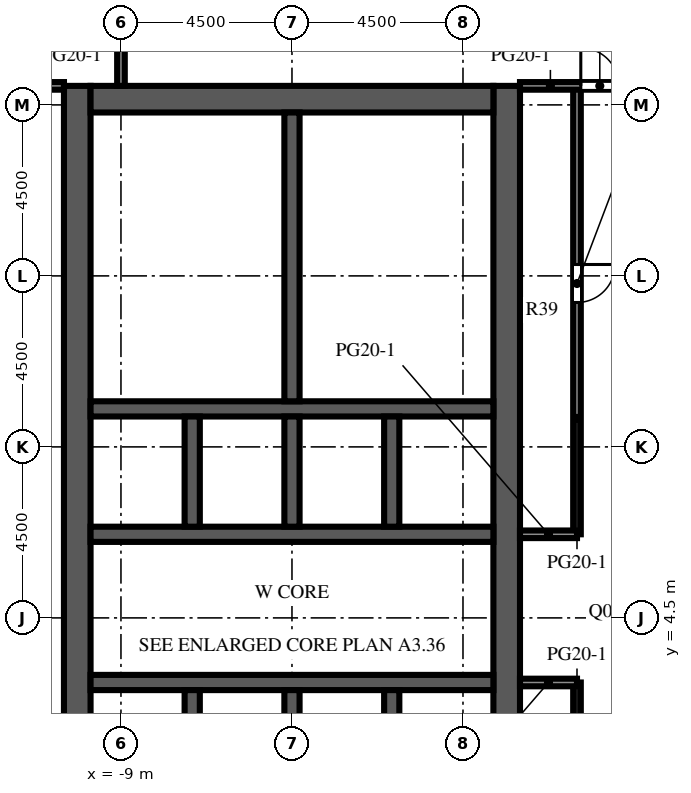
"""IFC4 building model, lengths in metres.
Left out: names, types, materials, properties, quantities, classifications, styles, units other than length and angle.
Written with IfcOpenShell. Run it as: python <this file> out.ifc"""

import sys

from ifc_helpers import new_model, si_unit, direction, frame, frame_2d, origin, place, context, subcontext, project, spatial, rectangle, extrude, element, fill, save


model = new_model("IFC4")
c1 = context("Model", 3, precision=1e-05, world=origin(), true_north=direction((0.0, 1.0)))
c2 = subcontext(c1, "Body", "Model", "MODEL_VIEW")
j1 = project(units=[si_unit("LENGTHUNIT", "METRE"), si_unit("PLANEANGLEUNIT", "RADIAN")], contexts=[c1])
p1 = place(None, origin())
s1 = spatial("IfcSite", under=j1, at=p1, CompositionType="ELEMENT")
p2 = place(p1, origin())
s2 = spatial("IfcBuilding", under=s1, at=p2, CompositionType="ELEMENT")
p3 = place(p2, frame((0.0, 0.0, 252.1)))
s3 = spatial("IfcBuildingStorey", under=s2, at=p3, CompositionType="ELEMENT", Elevation=252.1)
p4 = place(p3, frame((-10.15, -9.0, 0.0), z_axis=(0.0, 0.0, 1.0), x_axis=(0.0, 1.0, 0.0)))
e1 = element("IfcWall", 1, at=p4, inside=s3, PredefinedType="SHEAR", context=c2, shape_type="SweptSolid", body=[
    extrude(rectangle(XDim=27.5, YDim=0.7, at=frame_2d((13.75, 0.0))), origin(), (0.0, 0.0, 1.0), 4.1),
])
p5 = place(p4, frame((12.55, 0.0, 0.0)))
e2 = element("IfcOpeningElement", 2, at=p5, cuts=e1, PredefinedType="OPENING", context=c2, shape_type="SweptSolid", body=[
    extrude(rectangle(XDim=2.4, YDim=2.4, at=frame_2d((1.2, 1.2))), frame((0.0, 0.36, 0.0), z_axis=(0.0, -1.0, 0.0), x_axis=(1.0, 0.0, 0.0)), (0.0, 0.0, 1.0), 0.72),
])
p6 = place(p4, frame((6.825, 0.0, 0.0)))
e3 = element("IfcOpeningElement", 3, at=p6, cuts=e1, PredefinedType="OPENING", context=c2, shape_type="SweptSolid", body=[
    extrude(rectangle(XDim=1.2, YDim=2.1, at=frame_2d((0.6, 1.05))), frame((0.0, 0.36, 0.0), z_axis=(0.0, -1.0, 0.0), x_axis=(1.0, 0.0, 0.0)), (0.0, 0.0, 1.0), 0.72),
])
p7 = place(p4, frame((19.475, 0.0, 0.0)))
e4 = element("IfcOpeningElement", 4, at=p7, cuts=e1, PredefinedType="OPENING", context=c2, shape_type="SweptSolid", body=[
    extrude(rectangle(XDim=1.2, YDim=2.1, at=frame_2d((0.6, 1.05))), frame((0.0, 0.36, 0.0), z_axis=(0.0, -1.0, 0.0), x_axis=(1.0, 0.0, 0.0)), (0.0, 0.0, 1.0), 0.72),
])
p8 = place(p3, frame((1.15, -9.0, 0.0), z_axis=(0.0, 0.0, 1.0), x_axis=(0.0, 1.0, 0.0)))
e5 = element("IfcWall", 5, at=p8, inside=s3, PredefinedType="SHEAR", context=c2, shape_type="SweptSolid", body=[
    extrude(rectangle(XDim=27.5, YDim=0.7, at=frame_2d((13.75, 0.0))), origin(), (0.0, 0.0, 1.0), 4.1),
])
p9 = place(p8, frame((12.55, 0.0, 0.0)))
e6 = element("IfcOpeningElement", 6, at=p9, cuts=e5, PredefinedType="OPENING", context=c2, shape_type="SweptSolid", body=[
    extrude(rectangle(XDim=2.4, YDim=2.4, at=frame_2d((1.2, 1.2))), frame((0.0, 0.36, 0.0), z_axis=(0.0, -1.0, 0.0), x_axis=(1.0, 0.0, 0.0)), (0.0, 0.0, 1.0), 0.72),
])
p10 = place(p8, frame((3.9, 0.0, 0.0)))
e7 = element("IfcOpeningElement", 7, at=p10, cuts=e5, PredefinedType="OPENING", context=c2, shape_type="SweptSolid", body=[
    extrude(rectangle(XDim=1.2, YDim=2.1, at=frame_2d((0.6, 1.05))), frame((0.0, 0.36, 0.0), z_axis=(0.0, -1.0, 0.0), x_axis=(1.0, 0.0, 0.0)), (0.0, 0.0, 1.0), 0.72),
])
p11 = place(p8, frame((22.4, 0.0, 0.0)))
e8 = element("IfcOpeningElement", 8, at=p11, cuts=e5, PredefinedType="OPENING", context=c2, shape_type="SweptSolid", body=[
    extrude(rectangle(XDim=1.2, YDim=2.1, at=frame_2d((0.6, 1.05))), frame((0.0, 0.36, 0.0), z_axis=(0.0, -1.0, 0.0), x_axis=(1.0, 0.0, 0.0)), (0.0, 0.0, 1.0), 0.72),
])
p12 = place(p3, frame((-9.8, 18.15, 0.0), z_axis=(0.0, 0.0, 1.0), x_axis=(1.0, 0.0, 0.0)))
e9 = element("IfcWall", 9, at=p12, inside=s3, PredefinedType="SHEAR", context=c2, shape_type="SweptSolid", body=[
    extrude(rectangle(XDim=10.6, YDim=0.7, at=frame_2d((5.3, 0.0))), origin(), (0.0, 0.0, 1.0), 4.1),
])
p13 = place(p3, frame((-9.8, 2.8, 0.0), z_axis=(0.0, 0.0, 1.0), x_axis=(1.0, 0.0, 0.0)))
e10 = element("IfcWall", 10, at=p13, inside=s3, PredefinedType="SHEAR", context=c2, shape_type="SweptSolid", body=[
    extrude(rectangle(XDim=10.6, YDim=0.4, at=frame_2d((5.3, 0.0))), origin(), (0.0, 0.0, 1.0), 4.1),
])
p14 = place(p13, frame((0.688, 0.0, 0.0)))
e11 = element("IfcOpeningElement", 11, at=p14, cuts=e10, PredefinedType="OPENING", context=c2, shape_type="SweptSolid", body=[
    extrude(rectangle(XDim=1.1, YDim=2.1, at=frame_2d((0.55, 1.05))), frame((0.0, 0.21, 0.0), z_axis=(0.0, -1.0, 0.0), x_axis=(1.0, 0.0, 0.0)), (0.0, 0.0, 1.0), 0.42),
])
p15 = place(p13, frame((3.438, 0.0, 0.0)))
e12 = element("IfcOpeningElement", 12, at=p15, cuts=e10, PredefinedType="OPENING", context=c2, shape_type="SweptSolid", body=[
    extrude(rectangle(XDim=1.1, YDim=2.1, at=frame_2d((0.55, 1.05))), frame((0.0, 0.21, 0.0), z_axis=(0.0, -1.0, 0.0), x_axis=(1.0, 0.0, 0.0)), (0.0, 0.0, 1.0), 0.42),
])
p16 = place(p13, frame((6.113, 0.0, 0.0)))
e13 = element("IfcOpeningElement", 13, at=p16, cuts=e10, PredefinedType="OPENING", context=c2, shape_type="SweptSolid", body=[
    extrude(rectangle(XDim=1.0, YDim=2.1, at=frame_2d((0.5, 1.05))), frame((0.0, 0.21, 0.0), z_axis=(0.0, -1.0, 0.0), x_axis=(1.0, 0.0, 0.0)), (0.0, 0.0, 1.0), 0.42),
])
p17 = place(p13, frame((8.863, 0.0, 0.0)))
e14 = element("IfcOpeningElement", 14, at=p17, cuts=e10, PredefinedType="OPENING", context=c2, shape_type="SweptSolid", body=[
    extrude(rectangle(XDim=1.0, YDim=2.1, at=frame_2d((0.5, 1.05))), frame((0.0, 0.21, 0.0), z_axis=(0.0, -1.0, 0.0), x_axis=(1.0, 0.0, 0.0)), (0.0, 0.0, 1.0), 0.42),
])
p18 = place(p3, frame((-9.8, 6.7, 0.0), z_axis=(0.0, 0.0, 1.0), x_axis=(1.0, 0.0, 0.0)))
e15 = element("IfcWall", 15, at=p18, inside=s3, PredefinedType="SHEAR", context=c2, shape_type="SweptSolid", body=[
    extrude(rectangle(XDim=10.6, YDim=0.4, at=frame_2d((5.3, 0.0))), origin(), (0.0, 0.0, 1.0), 4.1),
])
p19 = place(p18, frame((3.438, 0.0, 0.0)))
e16 = element("IfcOpeningElement", 16, at=p19, cuts=e15, PredefinedType="OPENING", context=c2, shape_type="SweptSolid", body=[
    extrude(rectangle(XDim=1.1, YDim=2.1, at=frame_2d((0.55, 1.05))), frame((0.0, 0.21, 0.0), z_axis=(0.0, -1.0, 0.0), x_axis=(1.0, 0.0, 0.0)), (0.0, 0.0, 1.0), 0.42),
])
p20 = place(p18, frame((6.062, 0.0, 0.0)))
e17 = element("IfcOpeningElement", 17, at=p20, cuts=e15, PredefinedType="OPENING", context=c2, shape_type="SweptSolid", body=[
    extrude(rectangle(XDim=1.1, YDim=2.1, at=frame_2d((0.55, 1.05))), frame((0.0, 0.21, 0.0), z_axis=(0.0, -1.0, 0.0), x_axis=(1.0, 0.0, 0.0)), (0.0, 0.0, 1.0), 0.42),
])
p21 = place(p18, frame((8.812, 0.0, 0.0)))
e18 = element("IfcOpeningElement", 18, at=p21, cuts=e15, PredefinedType="OPENING", context=c2, shape_type="SweptSolid", body=[
    extrude(rectangle(XDim=1.1, YDim=2.1, at=frame_2d((0.55, 1.05))), frame((0.0, 0.21, 0.0), z_axis=(0.0, -1.0, 0.0), x_axis=(1.0, 0.0, 0.0)), (0.0, 0.0, 1.0), 0.42),
])
p22 = place(p18, frame((0.738, 0.0, 0.0)))
e19 = element("IfcOpeningElement", 19, at=p22, cuts=e15, PredefinedType="OPENING", context=c2, shape_type="SweptSolid", body=[
    extrude(rectangle(XDim=1.0, YDim=2.1, at=frame_2d((0.5, 1.05))), frame((0.0, 0.21, 0.0), z_axis=(0.0, -1.0, 0.0), x_axis=(1.0, 0.0, 0.0)), (0.0, 0.0, 1.0), 0.42),
])
p23 = place(p3, frame((-9.8, 10.0, 0.0), z_axis=(0.0, 0.0, 1.0), x_axis=(1.0, 0.0, 0.0)))
e20 = element("IfcWall", 20, at=p23, inside=s3, PredefinedType="SHEAR", context=c2, shape_type="SweptSolid", body=[
    extrude(rectangle(XDim=10.6, YDim=0.4, at=frame_2d((5.3, 0.0))), origin(), (0.0, 0.0, 1.0), 4.1),
])
for number, where, z_axis, x_axis in (
    (21, (-7.125, -0.3, 0.0), (0.0, 0.0, 1.0), (0.0, 1.0, 0.0)),
    (22, (-7.125, 6.9, 0.0), (0.0, 0.0, 1.0), (0.0, 1.0, 0.0)),
    (23, (-4.5, -0.3, 0.0), (0.0, 0.0, 1.0), (0.0, 1.0, 0.0)),
    (24, (-4.5, 6.9, 0.0), (0.0, 0.0, 1.0), (0.0, 1.0, 0.0)),
    (25, (-1.875, -0.3, 0.0), (0.0, 0.0, 1.0), (0.0, 1.0, 0.0)),
    (26, (-1.875, 6.9, 0.0), (0.0, 0.0, 1.0), (0.0, 1.0, 0.0)),
):
    element("IfcWall", number, at=place(p3, frame(where, z_axis=z_axis, x_axis=x_axis)), inside=s3, PredefinedType="SHEAR", context=c2, shape_type="SweptSolid", body=[
        extrude(rectangle(XDim=2.9, YDim=0.4, at=frame_2d((1.45, 0.0))), origin(), (0.0, 0.0, 1.0), 4.1),
    ])
p24 = place(p3, frame((-4.5, 10.2, 0.0), z_axis=(0.0, 0.0, 1.0), x_axis=(0.0, 1.0, 0.0)))
e27 = element("IfcWall", 27, at=p24, inside=s3, PredefinedType="SHEAR", context=c2, shape_type="SweptSolid", body=[
    extrude(rectangle(XDim=7.6, YDim=0.4, at=frame_2d((3.8, 0.0))), origin(), (0.0, 0.0, 1.0), 4.1),
])
p25 = place(p3, frame((-0.6, 10.2, 0.0), z_axis=(0.0, 0.0, 1.0), x_axis=(0.0, 1.0, 0.0)))
e28 = element("IfcWall", 28, at=p25, inside=s3, PredefinedType="PARTITIONING", context=c2, shape_type="SweptSolid", body=[
    extrude(rectangle(XDim=2.28, YDim=0.1, at=frame_2d((1.14, 0.0))), origin(), (0.0, 0.0, 1.0), 3.65),
])
p26 = place(p25, frame((0.64, 0.0, 0.0)))
e29 = element("IfcOpeningElement", 29, at=p26, cuts=e28, PredefinedType="OPENING", context=c2, shape_type="SweptSolid", body=[
    extrude(rectangle(XDim=1.0, YDim=2.1, at=frame_2d((0.5, 1.05))), frame((0.0, 0.06, 0.0), z_axis=(0.0, -1.0, 0.0), x_axis=(1.0, 0.0, 0.0)), (0.0, 0.0, 1.0), 0.12),
])
p27 = place(p3, frame((-0.6, 12.48, 0.0), z_axis=(0.0, 0.0, 1.0), x_axis=(0.0, 1.0, 0.0)))
e30 = element("IfcWall", 30, at=p27, inside=s3, PredefinedType="PARTITIONING", context=c2, shape_type="SweptSolid", body=[
    extrude(rectangle(XDim=2.432, YDim=0.1, at=frame_2d((1.216, 0.0))), origin(), (0.0, 0.0, 1.0), 3.65),
])
p28 = place(p27, frame((0.716, 0.0, 0.0)))
e31 = element("IfcOpeningElement", 31, at=p28, cuts=e30, PredefinedType="OPENING", context=c2, shape_type="SweptSolid", body=[
    extrude(rectangle(XDim=1.0, YDim=2.1, at=frame_2d((0.5, 1.05))), frame((0.0, 0.06, 0.0), z_axis=(0.0, -1.0, 0.0), x_axis=(1.0, 0.0, 0.0)), (0.0, 0.0, 1.0), 0.12),
])
p29 = place(p3, frame((-0.6, 14.912, 0.0), z_axis=(0.0, 0.0, 1.0), x_axis=(0.0, 1.0, 0.0)))
e32 = element("IfcWall", 32, at=p29, inside=s3, PredefinedType="PARTITIONING", context=c2, shape_type="SweptSolid", body=[
    extrude(rectangle(XDim=2.888, YDim=0.1, at=frame_2d((1.444, 0.0))), origin(), (0.0, 0.0, 1.0), 3.65),
])
p30 = place(p29, frame((0.944, 0.0, 0.0)))
e33 = element("IfcOpeningElement", 33, at=p30, cuts=e32, PredefinedType="OPENING", context=c2, shape_type="SweptSolid", body=[
    extrude(rectangle(XDim=1.0, YDim=2.1, at=frame_2d((0.5, 1.05))), frame((0.0, 0.06, 0.0), z_axis=(0.0, -1.0, 0.0), x_axis=(1.0, 0.0, 0.0)), (0.0, 0.0, 1.0), 0.12),
])
for number, where, z_axis, x_axis in (
    (34, (-4.3, 12.48, 0.0), (0.0, 0.0, 1.0), (1.0, 0.0, 0.0)),
    (35, (-4.3, 14.912, 0.0), (0.0, 0.0, 1.0), (1.0, 0.0, 0.0)),
):
    element("IfcWall", number, at=place(p3, frame(where, z_axis=z_axis, x_axis=x_axis)), inside=s3, PredefinedType="PARTITIONING", context=c2, shape_type="SweptSolid", body=[
        extrude(rectangle(XDim=3.7, YDim=0.1, at=frame_2d((1.85, 0.0))), origin(), (0.0, 0.0, 1.0), 3.65),
    ])
p31 = place(p3, frame((-9.0, 18.5, 0.0), z_axis=(0.0, 0.0, 1.0), x_axis=(0.0, 1.0, 0.0)))
e36 = element("IfcWall", 36, at=p31, inside=s3, PredefinedType="PARTITIONING", context=c2, shape_type="SweptSolid", body=[
    extrude(rectangle(XDim=3.5, YDim=0.2, at=frame_2d((1.75, 0.0))), origin(), (0.0, 0.0, 1.0), 3.65),
])
p32 = place(p3, frame((3.0, -3.5, 0.0), z_axis=(0.0, 0.0, 1.0), x_axis=(0.0, 1.0, 0.0)))
e37 = element("IfcWall", 37, at=p32, inside=s3, PredefinedType="PARTITIONING", context=c2, shape_type="SweptSolid", body=[
    extrude(rectangle(XDim=6.3, YDim=0.2, at=frame_2d((3.15, 0.0))), origin(), (0.0, 0.0, 1.0), 3.65),
])
p33 = place(p32, frame((2.35, 0.0, 0.0)))
e38 = element("IfcOpeningElement", 38, at=p33, cuts=e37, PredefinedType="OPENING", context=c2, shape_type="SweptSolid", body=[
    extrude(rectangle(XDim=1.0, YDim=2.1, at=frame_2d((0.5, 1.05))), frame((0.0, 0.11, 0.0), z_axis=(0.0, -1.0, 0.0), x_axis=(1.0, 0.0, 0.0)), (0.0, 0.0, 1.0), 0.22),
])
p34 = place(p3, frame((3.0, 6.7, 0.0), z_axis=(0.0, 0.0, 1.0), x_axis=(0.0, 1.0, 0.0)))
e39 = element("IfcWall", 39, at=p34, inside=s3, PredefinedType="PARTITIONING", context=c2, shape_type="SweptSolid", body=[
    extrude(rectangle(XDim=11.8, YDim=0.2, at=frame_2d((5.9, 0.0))), origin(), (0.0, 0.0, 1.0), 3.65),
])
p35 = place(p34, frame((6.1, 0.0, 0.0)))
e40 = element("IfcOpeningElement", 40, at=p35, cuts=e39, PredefinedType="OPENING", context=c2, shape_type="SweptSolid", body=[
    extrude(rectangle(XDim=1.0, YDim=2.1, at=frame_2d((0.5, 1.05))), frame((0.0, 0.11, 0.0), z_axis=(0.0, -1.0, 0.0), x_axis=(1.0, 0.0, 0.0)), (0.0, 0.0, 1.0), 0.22),
])
for number, where, z_axis, x_axis in (
    (41, (1.5, 2.8, 0.0), (0.0, 0.0, 1.0), (1.0, 0.0, 0.0)),
    (42, (1.5, 6.7, 0.0), (0.0, 0.0, 1.0), (1.0, 0.0, 0.0)),
):
    element("IfcWall", number, at=place(p3, frame(where, z_axis=z_axis, x_axis=x_axis)), inside=s3, PredefinedType="PARTITIONING", context=c2, shape_type="SweptSolid", body=[
        extrude(rectangle(XDim=1.5, YDim=0.2, at=frame_2d((0.75, 0.0))), origin(), (0.0, 0.0, 1.0), 3.65),
    ])
p36 = place(p3, frame((-13.5, 18.5, 0.0), z_axis=(0.0, 0.0, 1.0), x_axis=(1.0, 0.0, 0.0)))
e43 = element("IfcWall", 43, at=p36, inside=s3, PredefinedType="PARTITIONING", context=c2, shape_type="SweptSolid", body=[
    extrude(rectangle(XDim=3.0, YDim=0.2, at=frame_2d((1.5, 0.0))), origin(), (0.0, 0.0, 1.0), 3.65),
])
p37 = place(p36, frame((0.85, 0.0, 0.0)))
e44 = element("IfcOpeningElement", 44, at=p37, cuts=e43, PredefinedType="OPENING", context=c2, shape_type="SweptSolid", body=[
    extrude(rectangle(XDim=1.0, YDim=2.1, at=frame_2d((0.5, 1.05))), frame((0.0, 0.11, 0.0), z_axis=(0.0, -1.0, 0.0), x_axis=(1.0, 0.0, 0.0)), (0.0, 0.0, 1.0), 0.22),
])
p38 = place(p3, frame((1.5, 18.5, 0.0), z_axis=(0.0, 0.0, 1.0), x_axis=(1.0, 0.0, 0.0)))
e45 = element("IfcWall", 45, at=p38, inside=s3, PredefinedType="PARTITIONING", context=c2, shape_type="SweptSolid", body=[
    extrude(rectangle(XDim=4.5, YDim=0.2, at=frame_2d((2.25, 0.0))), origin(), (0.0, 0.0, 1.0), 3.65),
])
p39 = place(p38, frame((1.6, 0.0, 0.0)))
e46 = element("IfcOpeningElement", 46, at=p39, cuts=e45, PredefinedType="OPENING", context=c2, shape_type="SweptSolid", body=[
    extrude(rectangle(XDim=1.0, YDim=2.1, at=frame_2d((0.5, 1.05))), frame((0.0, 0.11, 0.0), z_axis=(0.0, -1.0, 0.0), x_axis=(1.0, 0.0, 0.0)), (0.0, 0.0, 1.0), 0.22),
])
p40 = place(p38, frame((3.35, 0.0, 0.0)))
e47 = element("IfcOpeningElement", 47, at=p40, cuts=e45, PredefinedType="OPENING", context=c2, shape_type="SweptSolid", body=[
    extrude(rectangle(XDim=1.0, YDim=2.1, at=frame_2d((0.5, 1.05))), frame((0.0, 0.11, 0.0), z_axis=(0.0, -1.0, 0.0), x_axis=(1.0, 0.0, 0.0)), (0.0, 0.0, 1.0), 0.22),
])
p41 = place(p14, origin())
e48 = element("IfcDoor", 48, at=p41, inside=s3, OperationType="DOUBLE_DOOR_SLIDING", PredefinedType="DOOR", context=c2, shape_type="SweptSolid", body=[
    extrude(rectangle(XDim=1.1, YDim=2.1, at=frame_2d((0.55, 1.05))), frame((0.0, 0.025, 0.0), z_axis=(0.0, -1.0, 0.0), x_axis=(1.0, 0.0, 0.0)), (0.0, 0.0, 1.0), 0.05),
])
fill(e11, e48)
p42 = place(p15, origin())
e49 = element("IfcDoor", 49, at=p42, inside=s3, OperationType="DOUBLE_DOOR_SLIDING", PredefinedType="DOOR", context=c2, shape_type="SweptSolid", body=[
    extrude(rectangle(XDim=1.1, YDim=2.1, at=frame_2d((0.55, 1.05))), frame((0.0, 0.025, 0.0), z_axis=(0.0, -1.0, 0.0), x_axis=(1.0, 0.0, 0.0)), (0.0, 0.0, 1.0), 0.05),
])
fill(e12, e49)
p43 = place(p19, origin())
e50 = element("IfcDoor", 50, at=p43, inside=s3, OperationType="DOUBLE_DOOR_SLIDING", PredefinedType="DOOR", context=c2, shape_type="SweptSolid", body=[
    extrude(rectangle(XDim=1.1, YDim=2.1, at=frame_2d((0.55, 1.05))), frame((0.0, 0.025, 0.0), z_axis=(0.0, -1.0, 0.0), x_axis=(1.0, 0.0, 0.0)), (0.0, 0.0, 1.0), 0.05),
])
fill(e16, e50)
p44 = place(p20, origin())
e51 = element("IfcDoor", 51, at=p44, inside=s3, OperationType="DOUBLE_DOOR_SLIDING", PredefinedType="DOOR", context=c2, shape_type="SweptSolid", body=[
    extrude(rectangle(XDim=1.1, YDim=2.1, at=frame_2d((0.55, 1.05))), frame((0.0, 0.025, 0.0), z_axis=(0.0, -1.0, 0.0), x_axis=(1.0, 0.0, 0.0)), (0.0, 0.0, 1.0), 0.05),
])
fill(e17, e51)
p45 = place(p21, origin())
e52 = element("IfcDoor", 52, at=p45, inside=s3, OperationType="DOUBLE_DOOR_SLIDING", PredefinedType="DOOR", context=c2, shape_type="SweptSolid", body=[
    extrude(rectangle(XDim=1.1, YDim=2.1, at=frame_2d((0.55, 1.05))), frame((0.0, 0.025, 0.0), z_axis=(0.0, -1.0, 0.0), x_axis=(1.0, 0.0, 0.0)), (0.0, 0.0, 1.0), 0.05),
])
fill(e18, e52)
p46 = place(p5, origin())
e53 = element("IfcDoor", 53, at=p46, inside=s3, OperationType="DOUBLE_DOOR_DOUBLE_SWING", PredefinedType="DOOR", context=c2, shape_type="SweptSolid", body=[
    extrude(rectangle(XDim=2.4, YDim=2.4, at=frame_2d((1.2, 1.2))), frame((0.0, 0.025, 0.0), z_axis=(0.0, -1.0, 0.0), x_axis=(1.0, 0.0, 0.0)), (0.0, 0.0, 1.0), 0.05),
])
fill(e2, e53)
p47 = place(p9, origin())
e54 = element("IfcDoor", 54, at=p47, inside=s3, OperationType="DOUBLE_DOOR_DOUBLE_SWING", PredefinedType="DOOR", context=c2, shape_type="SweptSolid", body=[
    extrude(rectangle(XDim=2.4, YDim=2.4, at=frame_2d((1.2, 1.2))), frame((0.0, 0.025, 0.0), z_axis=(0.0, -1.0, 0.0), x_axis=(1.0, 0.0, 0.0)), (0.0, 0.0, 1.0), 0.05),
])
fill(e6, e54)
p48 = place(p7, origin())
e55 = element("IfcDoor", 55, at=p48, inside=s3, OperationType="SINGLE_SWING_LEFT", PredefinedType="DOOR", context=c2, shape_type="SweptSolid", body=[
    extrude(rectangle(XDim=1.2, YDim=2.1, at=frame_2d((0.6, 1.05))), frame((0.0, 0.025, 0.0), z_axis=(0.0, -1.0, 0.0), x_axis=(1.0, 0.0, 0.0)), (0.0, 0.0, 1.0), 0.05),
])
fill(e4, e55)
p49 = place(p16, origin())
e56 = element("IfcDoor", 56, at=p49, inside=s3, OperationType="SINGLE_SWING_LEFT", PredefinedType="DOOR", context=c2, shape_type="SweptSolid", body=[
    extrude(rectangle(XDim=1.0, YDim=2.1, at=frame_2d((0.5, 1.05))), frame((0.0, 0.025, 0.0), z_axis=(0.0, -1.0, 0.0), x_axis=(1.0, 0.0, 0.0)), (0.0, 0.0, 1.0), 0.05),
])
fill(e13, e56)
p50 = place(p17, origin())
e57 = element("IfcDoor", 57, at=p50, inside=s3, OperationType="SINGLE_SWING_RIGHT", PredefinedType="DOOR", context=c2, shape_type="SweptSolid", body=[
    extrude(rectangle(XDim=1.0, YDim=2.1, at=frame_2d((0.5, 1.05))), frame((0.0, 0.025, 0.0), z_axis=(0.0, -1.0, 0.0), x_axis=(1.0, 0.0, 0.0)), (0.0, 0.0, 1.0), 0.05),
])
fill(e14, e57)
p51 = place(p22, origin())
e58 = element("IfcDoor", 58, at=p51, inside=s3, OperationType="SINGLE_SWING_LEFT", PredefinedType="DOOR", context=c2, shape_type="SweptSolid", body=[
    extrude(rectangle(XDim=1.0, YDim=2.1, at=frame_2d((0.5, 1.05))), frame((0.0, 0.025, 0.0), z_axis=(0.0, -1.0, 0.0), x_axis=(1.0, 0.0, 0.0)), (0.0, 0.0, 1.0), 0.05),
])
fill(e19, e58)
p52 = place(p11, origin())
e59 = element("IfcDoor", 59, at=p52, inside=s3, OperationType="SINGLE_SWING_LEFT", PredefinedType="DOOR", context=c2, shape_type="SweptSolid", body=[
    extrude(rectangle(XDim=1.2, YDim=2.1, at=frame_2d((0.6, 1.05))), frame((0.0, 0.325, 0.0), z_axis=(0.0, -1.0, 0.0), x_axis=(1.0, 0.0, 0.0)), (0.0, 0.0, 1.0), 0.05),
])
fill(e8, e59)
p53 = place(p26, origin())
e60 = element("IfcDoor", 60, at=p53, inside=s3, OperationType="SINGLE_SWING_RIGHT", PredefinedType="DOOR", context=c2, shape_type="SweptSolid", body=[
    extrude(rectangle(XDim=1.0, YDim=2.1, at=frame_2d((0.5, 1.05))), frame((0.0, 0.025, 0.0), z_axis=(0.0, -1.0, 0.0), x_axis=(1.0, 0.0, 0.0)), (0.0, 0.0, 1.0), 0.05),
])
fill(e29, e60)
p54 = place(p28, origin())
e61 = element("IfcDoor", 61, at=p54, inside=s3, OperationType="SINGLE_SWING_LEFT", PredefinedType="DOOR", context=c2, shape_type="SweptSolid", body=[
    extrude(rectangle(XDim=1.0, YDim=2.1, at=frame_2d((0.5, 1.05))), frame((0.0, 0.025, 0.0), z_axis=(0.0, -1.0, 0.0), x_axis=(1.0, 0.0, 0.0)), (0.0, 0.0, 1.0), 0.05),
])
fill(e31, e61)
p55 = place(p30, origin())
e62 = element("IfcDoor", 62, at=p55, inside=s3, OperationType="SINGLE_SWING_RIGHT", PredefinedType="DOOR", context=c2, shape_type="SweptSolid", body=[
    extrude(rectangle(XDim=1.0, YDim=2.1, at=frame_2d((0.5, 1.05))), frame((0.0, 0.025, 0.0), z_axis=(0.0, -1.0, 0.0), x_axis=(1.0, 0.0, 0.0)), (0.0, 0.0, 1.0), 0.05),
])
fill(e33, e62)
p56 = place(p35, origin())
e63 = element("IfcDoor", 63, at=p56, inside=s3, OperationType="SINGLE_SWING_RIGHT", PredefinedType="DOOR", context=c2, shape_type="SweptSolid", body=[
    extrude(rectangle(XDim=1.0, YDim=2.1, at=frame_2d((0.5, 1.05))), frame((0.0, 0.025, 0.0), z_axis=(0.0, -1.0, 0.0), x_axis=(1.0, 0.0, 0.0)), (0.0, 0.0, 1.0), 0.05),
])
fill(e40, e63)
p57 = place(p39, origin())
e64 = element("IfcDoor", 64, at=p57, inside=s3, OperationType="SINGLE_SWING_LEFT", PredefinedType="DOOR", context=c2, shape_type="SweptSolid", body=[
    extrude(rectangle(XDim=1.0, YDim=2.1, at=frame_2d((0.5, 1.05))), frame((0.0, 0.025, 0.0), z_axis=(0.0, -1.0, 0.0), x_axis=(1.0, 0.0, 0.0)), (0.0, 0.0, 1.0), 0.05),
])
fill(e46, e64)
save(model, sys.argv[1])
